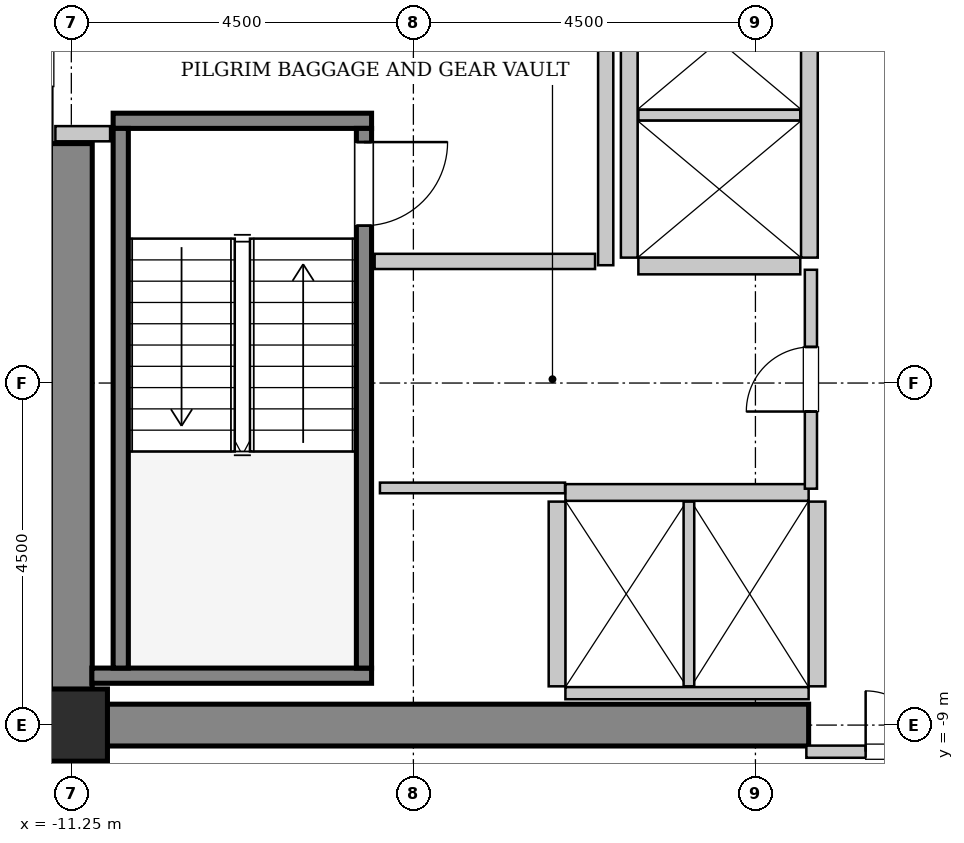
"""IFC4 building model, lengths in metres.
Left out: names, types, materials, properties, quantities, classifications, styles, units other than length and angle.
Written with IfcOpenShell. Run it as: python <this file> out.ifc"""

import sys

from ifc_helpers import new_model, si_unit, direction, frame, frame_2d, origin, origin_2d, place, context, subcontext, project, spatial, rectangle, hollow_rectangle, extrude, source, transform, mapped, element, fill, save


model = new_model("IFC4")
c1 = context("Model", 3, precision=1e-05, world=origin(), true_north=direction((0.0, 1.0)))
c2 = subcontext(c1, "Body", "Model", "MODEL_VIEW")
j1 = project(units=[si_unit("LENGTHUNIT", "METRE"), si_unit("PLANEANGLEUNIT", "RADIAN")], contexts=[c1])
p1 = place(None, origin())
s1 = spatial("IfcSite", under=j1, at=p1, CompositionType="ELEMENT")
p2 = place(p1, origin())
s2 = spatial("IfcBuilding", under=s1, at=p2, CompositionType="ELEMENT")
p3 = place(p2, frame((0.0, 0.0, 113.6)))
s3 = spatial("IfcBuildingStorey", under=s2, at=p3, CompositionType="ELEMENT", Elevation=113.6)
m1 = source(origin(), c2, "Body", "SweptSolid", [
    extrude(rectangle(XDim=9.975, YDim=0.55, at=frame_2d((4.987, 0.0))), origin(), (0.0, 0.0, 1.0), 3.8),
])
p4 = place(p3, frame((-11.525, -9.0, 0.0), z_axis=(0.0, 0.0, 1.0), x_axis=(1.0, 0.0, 0.0)))
e1 = element("IfcWall", 1, at=p4, inside=s3, PredefinedType="SHEAR", context=c2, shape_type="MappedRepresentation", body=[
    mapped(m1, transform((0.0, 0.0, 0.0), x_axis=(1.0, 0.0, 0.0), y_axis=(0.0, 1.0, 0.0), z_axis=(0.0, 0.0, 1.0), scale=1.0)),
])
m2 = source(origin(), c2, "Body", "SweptSolid", [
    extrude(rectangle(XDim=7.375, YDim=0.55, at=frame_2d((3.688, 0.0))), origin(), (0.0, 0.0, 1.0), 3.8),
])
p5 = place(p3, frame((-11.25, -8.725, 0.0), z_axis=(0.0, 0.0, 1.0), x_axis=(0.0, 1.0, 0.0)))
e2 = element("IfcWall", 2, at=p5, inside=s3, PredefinedType="SHEAR", context=c2, shape_type="MappedRepresentation", body=[
    mapped(m2, transform((0.0, 0.0, 0.0), x_axis=(1.0, 0.0, 0.0), y_axis=(0.0, 1.0, 0.0), z_axis=(0.0, 0.0, 1.0), scale=1.0)),
])
m3 = source(origin(), c2, "Body", "SweptSolid", [
    extrude(hollow_rectangle(XDim=0.95, YDim=0.95, WallThickness=0.045, InnerFilletRadius=0.045, OuterFilletRadius=0.09, at=origin_2d()), origin(), (0.0, 0.0, 1.0), 3.8),
])
p6 = place(p3, frame((-11.25, -9.0, 0.0), z_axis=(0.0, 0.0, 1.0), x_axis=(1.0, 0.0, 0.0)))
e3 = element("IfcColumn", 3, at=p6, inside=s3, PredefinedType="COLUMN", context=c2, shape_type="MappedRepresentation", body=[
    mapped(m3, transform((0.0, 0.0, 0.0), x_axis=(1.0, 0.0, 0.0), y_axis=(0.0, 1.0, 0.0), z_axis=(0.0, 0.0, 1.0), scale=1.0)),
])
m4 = source(origin(), c2, "Body", "SweptSolid", [
    extrude(rectangle(XDim=3.4, YDim=0.2, at=frame_2d((1.7, 0.0))), origin(), (0.0, 0.0, 1.0), 3.8),
])
p7 = place(p3, frame((-10.7, -1.05, 0.0), z_axis=(0.0, 0.0, 1.0), x_axis=(1.0, 0.0, 0.0)))
e4 = element("IfcWall", 4, at=p7, inside=s3, PredefinedType="SOLIDWALL", context=c2, shape_type="MappedRepresentation", body=[
    mapped(m4, transform((0.0, 0.0, 0.0), x_axis=(1.0, 0.0, 0.0), y_axis=(0.0, 1.0, 0.0), z_axis=(0.0, 0.0, 1.0), scale=1.0)),
])
m5 = source(origin(), c2, "Body", "SweptSolid", [
    extrude(rectangle(XDim=3.68, YDim=0.2, at=frame_2d((1.84, 0.0))), origin(), (0.0, 0.0, 1.0), 3.8),
])
p8 = place(p3, frame((-10.98, -8.35, 0.0), z_axis=(0.0, 0.0, 1.0), x_axis=(1.0, 0.0, 0.0)))
e5 = element("IfcWall", 5, at=p8, inside=s3, PredefinedType="SOLIDWALL", context=c2, shape_type="MappedRepresentation", body=[
    mapped(m5, transform((0.0, 0.0, 0.0), x_axis=(1.0, 0.0, 0.0), y_axis=(0.0, 1.0, 0.0), z_axis=(0.0, 0.0, 1.0), scale=1.0)),
])
m6 = source(origin(), c2, "Body", "SweptSolid", [
    extrude(rectangle(XDim=7.1, YDim=0.2, at=frame_2d((3.55, 0.0))), origin(), (0.0, 0.0, 1.0), 3.8),
])
p9 = place(p3, frame((-10.6, -1.15, 0.0), z_axis=(0.0, 0.0, 1.0), x_axis=(0.0, -1.0, 0.0)))
e6 = element("IfcWall", 6, at=p9, inside=s3, PredefinedType="SOLIDWALL", context=c2, shape_type="MappedRepresentation", body=[
    mapped(m6, transform((0.0, 0.0, 0.0), x_axis=(1.0, 0.0, 0.0), y_axis=(0.0, 1.0, 0.0), z_axis=(0.0, 0.0, 1.0), scale=1.0)),
])
p10 = place(p3, frame((-7.4, -1.15, 0.0), z_axis=(0.0, 0.0, 1.0), x_axis=(0.0, -1.0, 0.0)))
e7 = element("IfcWall", 7, at=p10, inside=s3, PredefinedType="SOLIDWALL", context=c2, shape_type="MappedRepresentation", body=[
    mapped(m6, transform((0.0, 0.0, 0.0), x_axis=(1.0, 0.0, 0.0), y_axis=(0.0, 1.0, 0.0), z_axis=(0.0, 0.0, 1.0), scale=1.0)),
])
p11 = place(p10, frame((0.18, 0.0, 0.0)))
e8 = element("IfcOpeningElement", 8, at=p11, cuts=e7, PredefinedType="OPENING", context=c2, shape_type="SweptSolid", body=[
    extrude(rectangle(XDim=1.1, YDim=2.15, at=frame_2d((0.55, 1.075))), frame((0.0, 0.11, 0.0), z_axis=(0.0, -1.0, 0.0), x_axis=(1.0, 0.0, 0.0)), (0.0, 0.0, 1.0), 0.22),
])
m7 = source(origin(), c2, "Body", "SweptSolid", [
    extrude(rectangle(XDim=3.2, YDim=0.22, at=frame_2d((1.6, 0.0))), origin(), (0.0, 0.0, 1.0), 3.535),
])
p12 = place(p3, frame((-1.55, -5.94, 0.0), z_axis=(0.0, 0.0, 1.0), x_axis=(-1.0, 0.0, 0.0)))
e9 = element("IfcWall", 9, at=p12, inside=s3, PredefinedType="SOLIDWALL", context=c2, shape_type="MappedRepresentation", body=[
    mapped(m7, transform((0.0, 0.0, 0.0), x_axis=(1.0, 0.0, 0.0), y_axis=(0.0, 1.0, 0.0), z_axis=(0.0, 0.0, 1.0), scale=1.0)),
])
m8 = source(origin(), c2, "Body", "SweptSolid", [
    extrude(rectangle(XDim=3.2, YDim=0.16, at=frame_2d((1.6, 0.0))), origin(), (0.0, 0.0, 1.0), 2.425),
])
p13 = place(p3, frame((-4.75, -8.58, 0.0), z_axis=(0.0, 0.0, 1.0), x_axis=(1.0, 0.0, 0.0)))
e10 = element("IfcWall", 10, at=p13, inside=s3, PredefinedType="PARTITIONING", context=c2, shape_type="MappedRepresentation", body=[
    mapped(m8, transform((0.0, 0.0, 0.0), x_axis=(1.0, 0.0, 0.0), y_axis=(0.0, 1.0, 0.0), z_axis=(0.0, 0.0, 1.0), scale=1.0)),
])
m9 = source(origin(), c2, "Body", "SweptSolid", [
    extrude(rectangle(XDim=2.43, YDim=0.22, at=frame_2d((1.215, 0.0))), origin(), (0.0, 0.0, 1.0), 3.535),
])
p14 = place(p3, frame((-4.86, -6.06, 0.0), z_axis=(0.0, 0.0, 1.0), x_axis=(0.0, -1.0, 0.0)))
e11 = element("IfcWall", 11, at=p14, inside=s3, PredefinedType="SOLIDWALL", context=c2, shape_type="MappedRepresentation", body=[
    mapped(m9, transform((0.0, 0.0, 0.0), x_axis=(1.0, 0.0, 0.0), y_axis=(0.0, 1.0, 0.0), z_axis=(0.0, 0.0, 1.0), scale=1.0)),
])
m10 = source(origin(), c2, "Body", "SweptSolid", [
    extrude(rectangle(XDim=2.43, YDim=0.14, at=frame_2d((1.215, 0.0))), origin(), (0.0, 0.0, 1.0), 3.535),
])
p15 = place(p3, frame((-3.125, -8.49, 0.0), z_axis=(0.0, 0.0, 1.0), x_axis=(0.0, 1.0, 0.0)))
e12 = element("IfcWall", 12, at=p15, inside=s3, PredefinedType="PARTITIONING", context=c2, shape_type="MappedRepresentation", body=[
    mapped(m10, transform((0.0, 0.0, 0.0), x_axis=(1.0, 0.0, 0.0), y_axis=(0.0, 1.0, 0.0), z_axis=(0.0, 0.0, 1.0), scale=1.0)),
])
p16 = place(p3, frame((-1.44, -8.49, 0.0), z_axis=(0.0, 0.0, 1.0), x_axis=(0.0, 1.0, 0.0)))
e13 = element("IfcWall", 13, at=p16, inside=s3, PredefinedType="SOLIDWALL", context=c2, shape_type="MappedRepresentation", body=[
    mapped(m9, transform((0.0, 0.0, 0.0), x_axis=(1.0, 0.0, 0.0), y_axis=(0.0, 1.0, 0.0), z_axis=(0.0, 0.0, 1.0), scale=1.0)),
])
m11 = source(origin(), c2, "Body", "SweptSolid", [
    extrude(rectangle(XDim=5.7, YDim=0.22, at=frame_2d((2.85, 0.0))), origin(), (0.0, 0.0, 1.0), 3.535),
])
for number, where, z_axis, x_axis in (
    (14, (-1.54, -2.85, 0.0), (0.0, 0.0, 1.0), (0.0, 1.0, 0.0)),
    (15, (-3.91, 2.85, 0.0), (0.0, 0.0, 1.0), (0.0, -1.0, 0.0)),
):
    element("IfcWall", number, at=place(p3, frame(where, z_axis=z_axis, x_axis=x_axis)), inside=s3, PredefinedType="SOLIDWALL", context=c2, shape_type="MappedRepresentation", body=[
        mapped(m11, transform((0.0, 0.0, 0.0), x_axis=(1.0, 0.0, 0.0), y_axis=(0.0, 1.0, 0.0), z_axis=(0.0, 0.0, 1.0), scale=1.0)),
    ])
m12 = source(origin(), c2, "Body", "SweptSolid", [
    extrude(rectangle(XDim=2.13, YDim=0.22, at=frame_2d((1.065, 0.0))), origin(), (0.0, 0.0, 1.0), 3.535),
])
p17 = place(p3, frame((-3.79, -2.96, 0.0), z_axis=(0.0, 0.0, 1.0), x_axis=(1.0, 0.0, 0.0)))
e16 = element("IfcWall", 16, at=p17, inside=s3, PredefinedType="SOLIDWALL", context=c2, shape_type="MappedRepresentation", body=[
    mapped(m12, transform((0.0, 0.0, 0.0), x_axis=(1.0, 0.0, 0.0), y_axis=(0.0, 1.0, 0.0), z_axis=(0.0, 0.0, 1.0), scale=1.0)),
])
m13 = source(origin(), c2, "Body", "SweptSolid", [
    extrude(rectangle(XDim=2.13, YDim=0.14, at=frame_2d((1.065, 0.0))), origin(), (0.0, 0.0, 1.0), 3.535),
])
p18 = place(p3, frame((-3.79, -0.975, 0.0), z_axis=(0.0, 0.0, 1.0), x_axis=(1.0, 0.0, 0.0)))
e17 = element("IfcWall", 17, at=p18, inside=s3, PredefinedType="PARTITIONING", context=c2, shape_type="MappedRepresentation", body=[
    mapped(m13, transform((0.0, 0.0, 0.0), x_axis=(1.0, 0.0, 0.0), y_axis=(0.0, 1.0, 0.0), z_axis=(0.0, 0.0, 1.0), scale=1.0)),
])
m14 = source(origin(), c2, "Body", "SweptSolid", [
    extrude(rectangle(XDim=5.9, YDim=0.2, at=frame_2d((2.95, 0.0))), origin(), (0.0, 0.0, 1.0), 3.535),
])
p19 = place(p3, frame((-4.22, -2.95, 0.0), z_axis=(0.0, 0.0, 1.0), x_axis=(0.0, 1.0, 0.0)))
e18 = element("IfcWall", 18, at=p19, inside=s3, PredefinedType="PARTITIONING", context=c2, shape_type="MappedRepresentation", body=[
    mapped(m14, transform((0.0, 0.0, 0.0), x_axis=(1.0, 0.0, 0.0), y_axis=(0.0, 1.0, 0.0), z_axis=(0.0, 0.0, 1.0), scale=1.0)),
])
m15 = source(origin(), c2, "Body", "SweptSolid", [
    extrude(rectangle(XDim=2.9, YDim=0.2, at=frame_2d((1.45, 0.0))), origin(), (0.0, 0.0, 1.0), 3.535),
])
p20 = place(p3, frame((-7.26, -2.9, 0.0), z_axis=(0.0, 0.0, 1.0), x_axis=(1.0, 0.0, 0.0)))
e19 = element("IfcWall", 19, at=p20, inside=s3, PredefinedType="PARTITIONING", context=c2, shape_type="MappedRepresentation", body=[
    mapped(m15, transform((0.0, 0.0, 0.0), x_axis=(1.0, 0.0, 0.0), y_axis=(0.0, 1.0, 0.0), z_axis=(0.0, 0.0, 1.0), scale=1.0)),
])
m16 = source(origin(), c2, "Body", "SweptSolid", [
    extrude(rectangle(XDim=0.72, YDim=0.2, at=frame_2d((0.36, 0.0))), origin(), (0.0, 0.0, 1.0), 3.535),
])
p21 = place(p3, frame((-11.46, -1.22, 0.0), z_axis=(0.0, 0.0, 1.0), x_axis=(1.0, 0.0, 0.0)))
e20 = element("IfcWall", 20, at=p21, inside=s3, PredefinedType="PARTITIONING", context=c2, shape_type="MappedRepresentation", body=[
    mapped(m16, transform((0.0, 0.0, 0.0), x_axis=(1.0, 0.0, 0.0), y_axis=(0.0, 1.0, 0.0), z_axis=(0.0, 0.0, 1.0), scale=1.0)),
])
m17 = source(origin(), c2, "Body", "SweptSolid", [
    extrude(rectangle(XDim=3.16, YDim=0.16, at=frame_2d((1.58, 0.0))), origin(), (0.0, 0.0, 1.0), 2.425),
])
p22 = place(p3, frame((-1.58, -9.35, 0.0), z_axis=(0.0, 0.0, 1.0), x_axis=(1.0, 0.0, 0.0)))
e21 = element("IfcWall", 21, at=p22, inside=s3, PredefinedType="PARTITIONING", context=c2, shape_type="MappedRepresentation", body=[
    mapped(m17, transform((0.0, 0.0, 0.0), x_axis=(1.0, 0.0, 0.0), y_axis=(0.0, 1.0, 0.0), z_axis=(0.0, 0.0, 1.0), scale=1.0)),
])
p23 = place(p22, frame((0.78, 0.0, 0.0)))
e22 = element("IfcOpeningElement", 22, at=p23, cuts=e21, PredefinedType="OPENING", context=c2, shape_type="SweptSolid", body=[
    extrude(rectangle(XDim=1.6, YDim=2.3, at=frame_2d((0.8, 1.15))), frame((0.0, 0.09, 0.0), z_axis=(0.0, -1.0, 0.0), x_axis=(1.0, 0.0, 0.0)), (0.0, 0.0, 1.0), 0.18),
])
m18 = source(origin(), c2, "Body", "SweptSolid", [
    extrude(rectangle(XDim=2.88, YDim=0.16, at=frame_2d((1.44, 0.0))), origin(), (0.0, 0.0, 1.0), 3.535),
])
p24 = place(p3, frame((-1.52, -5.89, 0.0), z_axis=(0.0, 0.0, 1.0), x_axis=(0.0, 1.0, 0.0)))
e23 = element("IfcWall", 23, at=p24, inside=s3, PredefinedType="PARTITIONING", context=c2, shape_type="MappedRepresentation", body=[
    mapped(m18, transform((0.0, 0.0, 0.0), x_axis=(1.0, 0.0, 0.0), y_axis=(0.0, 1.0, 0.0), z_axis=(0.0, 0.0, 1.0), scale=1.0)),
])
p25 = place(p24, frame((1.015, 0.0, 0.0)))
e24 = element("IfcOpeningElement", 24, at=p25, cuts=e23, PredefinedType="OPENING", context=c2, shape_type="SweptSolid", body=[
    extrude(rectangle(XDim=0.85, YDim=2.1, at=frame_2d((0.425, 1.05))), frame((0.0, 0.09, 0.0), z_axis=(0.0, -1.0, 0.0), x_axis=(1.0, 0.0, 0.0)), (0.0, 0.0, 1.0), 0.18),
])
m19 = source(origin(), c2, "Body", "SweptSolid", [
    extrude(rectangle(XDim=2.435, YDim=0.14, at=frame_2d((1.218, 0.0))), origin(), (0.0, 0.0, 1.0), 3.535),
])
p26 = place(p3, frame((-7.19, -5.88, 0.0), z_axis=(0.0, 0.0, 1.0), x_axis=(1.0, 0.0, 0.0)))
e25 = element("IfcWall", 25, at=p26, inside=s3, PredefinedType="PARTITIONING", context=c2, shape_type="MappedRepresentation", body=[
    mapped(m19, transform((0.0, 0.0, 0.0), x_axis=(1.0, 0.0, 0.0), y_axis=(0.0, 1.0, 0.0), z_axis=(0.0, 0.0, 1.0), scale=1.0)),
])
m20 = source(origin(), c2, "Body", "SweptSolid", [
    extrude(rectangle(XDim=1.1, YDim=2.15, at=frame_2d((0.55, 1.075))), frame((0.0, 0.025, 0.0), z_axis=(0.0, -1.0, 0.0), x_axis=(1.0, 0.0, 0.0)), (0.0, 0.0, 1.0), 0.05),
])
p27 = place(p11, origin())
e26 = element("IfcDoor", 26, at=p27, inside=s3, OperationType="SINGLE_SWING_LEFT", PredefinedType="DOOR", context=c2, shape_type="MappedRepresentation", body=[
    mapped(m20, transform((0.0, 0.0, 0.0), x_axis=(1.0, 0.0, 0.0), y_axis=(0.0, 1.0, 0.0), z_axis=(0.0, 0.0, 1.0), scale=1.0)),
])
fill(e8, e26)
m21 = source(origin(), c2, "Body", "SweptSolid", [
    extrude(rectangle(XDim=1.6, YDim=2.3, at=frame_2d((0.8, 1.15))), frame((0.0, 0.025, 0.0), z_axis=(0.0, -1.0, 0.0), x_axis=(1.0, 0.0, 0.0)), (0.0, 0.0, 1.0), 0.05),
])
p28 = place(p23, origin())
e27 = element("IfcDoor", 27, at=p28, inside=s3, OperationType="DOUBLE_DOOR_SINGLE_SWING", PredefinedType="DOOR", context=c2, shape_type="MappedRepresentation", body=[
    mapped(m21, transform((0.0, 0.0, 0.0), x_axis=(1.0, 0.0, 0.0), y_axis=(0.0, 1.0, 0.0), z_axis=(0.0, 0.0, 1.0), scale=1.0)),
])
fill(e22, e27)
m22 = source(origin(), c2, "Body", "SweptSolid", [
    extrude(rectangle(XDim=0.85, YDim=2.1, at=frame_2d((0.425, 1.05))), frame((0.0, 0.025, 0.0), z_axis=(0.0, -1.0, 0.0), x_axis=(1.0, 0.0, 0.0)), (0.0, 0.0, 1.0), 0.05),
])
p29 = place(p25, origin())
e28 = element("IfcDoor", 28, at=p29, inside=s3, OperationType="SINGLE_SWING_LEFT", PredefinedType="DOOR", context=c2, shape_type="MappedRepresentation", body=[
    mapped(m22, transform((0.0, 0.0, 0.0), x_axis=(1.0, 0.0, 0.0), y_axis=(0.0, 1.0, 0.0), z_axis=(0.0, 0.0, 1.0), scale=1.0)),
])
fill(e24, e28)
save(model, sys.argv[1])
